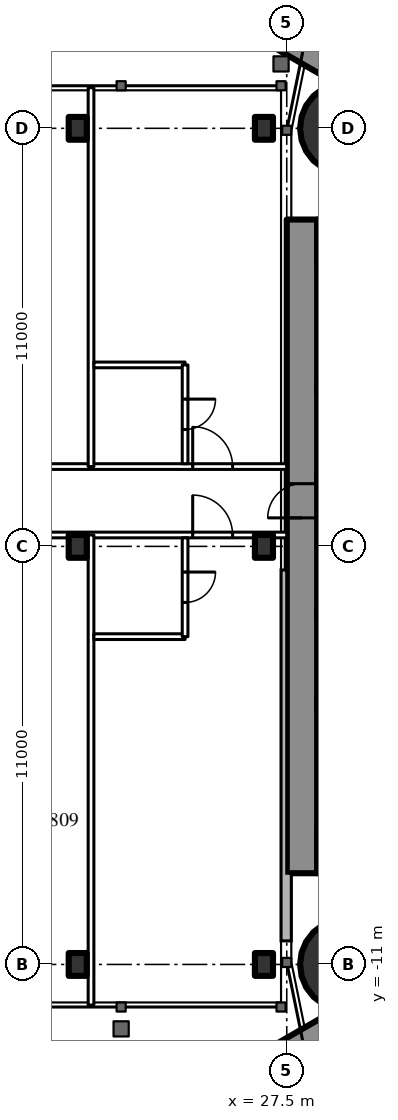
"""IFC4 building model, lengths in metres.
Left out: names, types, materials, properties, quantities, classifications, styles, units other than length and angle.
Written with IfcOpenShell. Run it as: python <this file> out.ifc"""

import sys

from ifc_helpers import new_model, si_unit, direction, frame, frame_2d, origin, origin_2d, place, context, subcontext, project, spatial, rectangle, circle, i_section, extrude, element, fill, save


model = new_model("IFC4")
c1 = context("Model", 3, precision=1e-05, world=origin(), true_north=direction((0.0, 1.0)))
c2 = subcontext(c1, "Body", "Model", "MODEL_VIEW")
j1 = project(units=[si_unit("LENGTHUNIT", "METRE"), si_unit("PLANEANGLEUNIT", "RADIAN")], contexts=[c1])
p1 = place(None, origin())
s1 = spatial("IfcSite", under=j1, at=p1, CompositionType="ELEMENT")
p2 = place(p1, origin())
s2 = spatial("IfcBuilding", under=s1, at=p2, CompositionType="ELEMENT")
p3 = place(p2, frame((0.0, 0.0, 218.9)))
s3 = spatial("IfcBuildingStorey", under=s2, at=p3, CompositionType="ELEMENT", Elevation=218.9)
for number, where, z_axis, x_axis in (
    (1, (29.05, 11.0, 0.0), (0.0, 0.0, 1.0), (1.0, 0.0, 0.0)),
    (2, (29.05, -11.0, 0.0), (0.0, 0.0, 1.0), (1.0, 0.0, 0.0)),
):
    element("IfcColumn", number, at=place(p3, frame(where, z_axis=z_axis, x_axis=x_axis)), inside=s3, PredefinedType="COLUMN", context=c2, shape_type="SweptSolid", body=[
        extrude(circle(Radius=1.2, at=origin_2d()), origin(), (0.0, 0.0, 1.0), 3.6),
    ])
p4 = place(p3, frame((27.9, -8.6, 0.0), z_axis=(0.0, 0.0, 1.0), x_axis=(0.0, 1.0, 0.0)))
e3 = element("IfcWall", 3, at=p4, inside=s3, PredefinedType="SHEAR", context=c2, shape_type="SweptSolid", body=[
    extrude(rectangle(XDim=17.2, YDim=0.8, at=frame_2d((8.6, 0.0))), origin(), (0.0, 0.0, 1.0), 3.6),
])
p5 = place(p4, frame((9.35, 0.0, 0.0)))
e4 = element("IfcOpeningElement", 4, at=p5, cuts=e3, PredefinedType="OPENING", context=c2, shape_type="SweptSolid", body=[
    extrude(rectangle(XDim=0.9, YDim=2.2, at=frame_2d((0.45, 1.1))), frame((0.0, 0.41, 0.0), z_axis=(0.0, -1.0, 0.0), x_axis=(1.0, 0.0, 0.0)), (0.0, 0.0, 1.0), 0.82),
])
p6 = place(p3, frame((28.3, -8.0, 0.0), z_axis=(0.0, 0.0, 1.0), x_axis=(1.0, 0.0, 0.0)))
e5 = element("IfcWall", 5, at=p6, inside=s3, PredefinedType="SHEAR", context=c2, shape_type="SweptSolid", body=[
    extrude(rectangle(XDim=8.4, YDim=1.2, at=frame_2d((4.2, 0.0))), origin(), (0.0, 0.0, 1.0), 3.6),
])
p7 = place(p6, frame((0.25, 0.0, 0.0)))
e6 = element("IfcOpeningElement", 6, at=p7, cuts=e5, PredefinedType="OPENING", context=c2, shape_type="SweptSolid", body=[
    extrude(rectangle(XDim=1.0, YDim=2.2, at=frame_2d((0.5, 1.1))), frame((0.0, 0.61, 0.0), z_axis=(0.0, -1.0, 0.0), x_axis=(1.0, 0.0, 0.0)), (0.0, 0.0, 1.0), 1.22),
])
p8 = place(p3, frame((28.3, 8.0, 0.0), z_axis=(0.0, 0.0, 1.0), x_axis=(1.0, 0.0, 0.0)))
e7 = element("IfcWall", 7, at=p8, inside=s3, PredefinedType="SHEAR", context=c2, shape_type="SweptSolid", body=[
    extrude(rectangle(XDim=8.4, YDim=1.2, at=frame_2d((4.2, 0.0))), origin(), (0.0, 0.0, 1.0), 3.6),
])
p9 = place(p8, frame((0.25, 0.0, 0.0)))
e8 = element("IfcOpeningElement", 8, at=p9, cuts=e7, PredefinedType="OPENING", context=c2, shape_type="SweptSolid", body=[
    extrude(rectangle(XDim=1.0, YDim=2.2, at=frame_2d((0.5, 1.1))), frame((0.0, 0.61, 0.0), z_axis=(0.0, -1.0, 0.0), x_axis=(1.0, 0.0, 0.0)), (0.0, 0.0, 1.0), 1.22),
])
for number, where, z_axis, x_axis in (
    (9, (28.3, -4.15, 0.0), (0.0, 0.0, 1.0), (1.0, 0.0, 0.0)),
    (10, (28.3, 4.15, 0.0), (0.0, 0.0, 1.0), (1.0, 0.0, 0.0)),
):
    element("IfcWall", number, at=place(p3, frame(where, z_axis=z_axis, x_axis=x_axis)), inside=s3, PredefinedType="SHEAR", context=c2, shape_type="SweptSolid", body=[
        extrude(rectangle(XDim=8.4, YDim=0.3, at=frame_2d((4.2, 0.0))), origin(), (0.0, 0.0, 1.0), 3.6),
    ])
for number, where, z_axis, x_axis in (
    (11, (28.3, -1.775, 0.0), (0.0, 0.0, 1.0), (1.0, 0.0, 0.0)),
    (12, (28.3, 1.775, 0.0), (0.0, 0.0, 1.0), (1.0, 0.0, 0.0)),
):
    element("IfcWall", number, at=place(p3, frame(where, z_axis=z_axis, x_axis=x_axis)), inside=s3, PredefinedType="SHEAR", context=c2, shape_type="SweptSolid", body=[
        extrude(rectangle(XDim=2.9, YDim=0.25, at=frame_2d((1.45, 0.0))), origin(), (0.0, 0.0, 1.0), 3.6),
    ])
p10 = place(p3, frame((27.2, -13.8, 0.0), z_axis=(0.0, 0.0, 1.0), x_axis=(0.866027159892, 0.499996958321, 0.0)))
e13 = element("IfcWall", 13, at=p10, inside=s3, PredefinedType="SHEAR", context=c2, shape_type="SweptSolid", body=[
    extrude(rectangle(XDim=27.947, YDim=1.2, at=frame_2d((13.973, 0.0))), origin(), (0.0, 0.0, 1.0), 3.6),
])
p11 = place(p10, frame((4.6, 0.0, 0.0)))
e14 = element("IfcOpeningElement", 14, at=p11, cuts=e13, PredefinedType="OPENING", context=c2, shape_type="SweptSolid", body=[
    extrude(rectangle(XDim=1.0, YDim=2.2, at=frame_2d((0.5, 1.1))), frame((0.0, 0.61, 0.0), z_axis=(0.0, -1.0, 0.0), x_axis=(1.0, 0.0, 0.0)), (0.0, 0.0, 1.0), 1.22),
])
p12 = place(p10, frame((13.395, 0.0, 0.0)))
e15 = element("IfcOpeningElement", 15, at=p12, cuts=e13, PredefinedType="OPENING", context=c2, shape_type="SweptSolid", body=[
    extrude(rectangle(XDim=1.8, YDim=2.2, at=frame_2d((0.9, 1.1))), frame((0.0, 0.61, 0.0), z_axis=(0.0, -1.0, 0.0), x_axis=(1.0, 0.0, 0.0)), (0.0, 0.0, 1.0), 1.22),
])
p13 = place(p3, frame((27.2, 13.8, 0.0), z_axis=(0.0, 0.0, 1.0), x_axis=(0.866024515034, -0.500001539357, 0.0)))
e16 = element("IfcWall", 16, at=p13, inside=s3, PredefinedType="SHEAR", context=c2, shape_type="SweptSolid", body=[
    extrude(rectangle(XDim=26.907, YDim=1.2, at=frame_2d((13.454, 0.0))), origin(), (0.0, 0.0, 1.0), 3.6),
])
p14 = place(p13, frame((4.6, 0.0, 0.0)))
e17 = element("IfcOpeningElement", 17, at=p14, cuts=e16, PredefinedType="OPENING", context=c2, shape_type="SweptSolid", body=[
    extrude(rectangle(XDim=1.0, YDim=2.2, at=frame_2d((0.5, 1.1))), frame((0.0, 0.61, 0.0), z_axis=(0.0, -1.0, 0.0), x_axis=(1.0, 0.0, 0.0)), (0.0, 0.0, 1.0), 1.22),
])
p15 = place(p13, frame((13.395, 0.0, 0.0)))
e18 = element("IfcOpeningElement", 18, at=p15, cuts=e16, PredefinedType="OPENING", context=c2, shape_type="SweptSolid", body=[
    extrude(rectangle(XDim=1.8, YDim=2.2, at=frame_2d((0.9, 1.1))), frame((0.0, 0.61, 0.0), z_axis=(0.0, -1.0, 0.0), x_axis=(1.0, 0.0, 0.0)), (0.0, 0.0, 1.0), 1.22),
])
for number, where, z_axis, x_axis in (
    (19, (22.0, -11.0, 0.0), (0.0, 0.0, 1.0), (1.0, 0.0, 0.0)),
    (20, (26.9, -11.0, 0.0), (0.0, 0.0, 1.0), (1.0, 0.0, 0.0)),
    (21, (22.0, 0.0, 0.0), (0.0, 0.0, 1.0), (1.0, 0.0, 0.0)),
    (22, (26.9, 0.0, 0.0), (0.0, 0.0, 1.0), (1.0, 0.0, 0.0)),
    (23, (22.0, 11.0, 0.0), (0.0, 0.0, 1.0), (1.0, 0.0, 0.0)),
    (24, (26.9, 11.0, 0.0), (0.0, 0.0, 1.0), (1.0, 0.0, 0.0)),
):
    element("IfcColumn", number, at=place(p3, frame(where, z_axis=z_axis, x_axis=x_axis)), inside=s3, PredefinedType="COLUMN", context=c2, shape_type="SweptSolid", body=[
        extrude(i_section(OverallWidth=0.476, OverallDepth=0.6, WebThickness=0.1, FlangeThickness=0.14, FilletRadius=0.02, at=origin_2d()), origin(), (0.0, 0.0, 1.0), 3.6),
    ])
p16 = place(p3, frame((-27.5, 0.3, 0.0), z_axis=(0.0, 0.0, 1.0), x_axis=(1.0, 0.0, 0.0)))
e25 = element("IfcWall", 25, at=p16, inside=s3, PredefinedType="PARTITIONING", context=c2, shape_type="SweptSolid", body=[
    extrude(rectangle(XDim=55.0, YDim=0.15, at=frame_2d((27.5, 0.0))), origin(), (0.0, 0.0, 1.0), 2.4),
])
p17 = place(p16, frame((1.575, 0.0, 0.0)))
e26 = element("IfcOpeningElement", 26, at=p17, cuts=e25, PredefinedType="OPENING", context=c2, shape_type="SweptSolid", body=[
    extrude(rectangle(XDim=1.0, YDim=2.2, at=frame_2d((0.5, 1.1))), frame((0.0, 0.085, 0.0), z_axis=(0.0, -1.0, 0.0), x_axis=(1.0, 0.0, 0.0)), (0.0, 0.0, 1.0), 0.17),
])
p18 = place(p16, frame((8.525, 0.0, 0.0)))
e27 = element("IfcOpeningElement", 27, at=p18, cuts=e25, PredefinedType="OPENING", context=c2, shape_type="SweptSolid", body=[
    extrude(rectangle(XDim=1.05, YDim=2.4, at=frame_2d((0.525, 1.2))), frame((0.0, 0.085, 0.0), z_axis=(0.0, -1.0, 0.0), x_axis=(1.0, 0.0, 0.0)), (0.0, 0.0, 1.0), 0.17),
])
p19 = place(p16, frame((14.025, 0.0, 0.0)))
e28 = element("IfcOpeningElement", 28, at=p19, cuts=e25, PredefinedType="OPENING", context=c2, shape_type="SweptSolid", body=[
    extrude(rectangle(XDim=1.05, YDim=2.4, at=frame_2d((0.525, 1.2))), frame((0.0, 0.085, 0.0), z_axis=(0.0, -1.0, 0.0), x_axis=(1.0, 0.0, 0.0)), (0.0, 0.0, 1.0), 0.17),
])
p20 = place(p16, frame((19.525, 0.0, 0.0)))
e29 = element("IfcOpeningElement", 29, at=p20, cuts=e25, PredefinedType="OPENING", context=c2, shape_type="SweptSolid", body=[
    extrude(rectangle(XDim=1.05, YDim=2.4, at=frame_2d((0.525, 1.2))), frame((0.0, 0.085, 0.0), z_axis=(0.0, -1.0, 0.0), x_axis=(1.0, 0.0, 0.0)), (0.0, 0.0, 1.0), 0.17),
])
p21 = place(p16, frame((25.025, 0.0, 0.0)))
e30 = element("IfcOpeningElement", 30, at=p21, cuts=e25, PredefinedType="OPENING", context=c2, shape_type="SweptSolid", body=[
    extrude(rectangle(XDim=1.05, YDim=2.4, at=frame_2d((0.525, 1.2))), frame((0.0, 0.085, 0.0), z_axis=(0.0, -1.0, 0.0), x_axis=(1.0, 0.0, 0.0)), (0.0, 0.0, 1.0), 0.17),
])
p22 = place(p16, frame((30.525, 0.0, 0.0)))
e31 = element("IfcOpeningElement", 31, at=p22, cuts=e25, PredefinedType="OPENING", context=c2, shape_type="SweptSolid", body=[
    extrude(rectangle(XDim=1.05, YDim=2.4, at=frame_2d((0.525, 1.2))), frame((0.0, 0.085, 0.0), z_axis=(0.0, -1.0, 0.0), x_axis=(1.0, 0.0, 0.0)), (0.0, 0.0, 1.0), 0.17),
])
p23 = place(p16, frame((36.025, 0.0, 0.0)))
e32 = element("IfcOpeningElement", 32, at=p23, cuts=e25, PredefinedType="OPENING", context=c2, shape_type="SweptSolid", body=[
    extrude(rectangle(XDim=1.05, YDim=2.4, at=frame_2d((0.525, 1.2))), frame((0.0, 0.085, 0.0), z_axis=(0.0, -1.0, 0.0), x_axis=(1.0, 0.0, 0.0)), (0.0, 0.0, 1.0), 0.17),
])
p24 = place(p16, frame((41.525, 0.0, 0.0)))
e33 = element("IfcOpeningElement", 33, at=p24, cuts=e25, PredefinedType="OPENING", context=c2, shape_type="SweptSolid", body=[
    extrude(rectangle(XDim=1.05, YDim=2.4, at=frame_2d((0.525, 1.2))), frame((0.0, 0.085, 0.0), z_axis=(0.0, -1.0, 0.0), x_axis=(1.0, 0.0, 0.0)), (0.0, 0.0, 1.0), 0.17),
])
p25 = place(p16, frame((47.025, 0.0, 0.0)))
e34 = element("IfcOpeningElement", 34, at=p25, cuts=e25, PredefinedType="OPENING", context=c2, shape_type="SweptSolid", body=[
    extrude(rectangle(XDim=1.05, YDim=2.4, at=frame_2d((0.525, 1.2))), frame((0.0, 0.085, 0.0), z_axis=(0.0, -1.0, 0.0), x_axis=(1.0, 0.0, 0.0)), (0.0, 0.0, 1.0), 0.17),
])
p26 = place(p16, frame((52.525, 0.0, 0.0)))
e35 = element("IfcOpeningElement", 35, at=p26, cuts=e25, PredefinedType="OPENING", context=c2, shape_type="SweptSolid", body=[
    extrude(rectangle(XDim=1.05, YDim=2.4, at=frame_2d((0.525, 1.2))), frame((0.0, 0.085, 0.0), z_axis=(0.0, -1.0, 0.0), x_axis=(1.0, 0.0, 0.0)), (0.0, 0.0, 1.0), 0.17),
])
p27 = place(p3, frame((-27.5, 2.1, 0.0), z_axis=(0.0, 0.0, 1.0), x_axis=(1.0, 0.0, 0.0)))
e36 = element("IfcWall", 36, at=p27, inside=s3, PredefinedType="PARTITIONING", context=c2, shape_type="SweptSolid", body=[
    extrude(rectangle(XDim=55.0, YDim=0.15, at=frame_2d((27.5, 0.0))), origin(), (0.0, 0.0, 1.0), 3.4),
])
p28 = place(p27, frame((2.025, 0.0, 0.0)))
e37 = element("IfcOpeningElement", 37, at=p28, cuts=e36, PredefinedType="OPENING", context=c2, shape_type="SweptSolid", body=[
    extrude(rectangle(XDim=1.05, YDim=2.4, at=frame_2d((0.525, 1.2))), frame((0.0, 0.085, 0.0), z_axis=(0.0, -1.0, 0.0), x_axis=(1.0, 0.0, 0.0)), (0.0, 0.0, 1.0), 0.17),
])
p29 = place(p27, frame((8.525, 0.0, 0.0)))
e38 = element("IfcOpeningElement", 38, at=p29, cuts=e36, PredefinedType="OPENING", context=c2, shape_type="SweptSolid", body=[
    extrude(rectangle(XDim=1.05, YDim=2.4, at=frame_2d((0.525, 1.2))), frame((0.0, 0.085, 0.0), z_axis=(0.0, -1.0, 0.0), x_axis=(1.0, 0.0, 0.0)), (0.0, 0.0, 1.0), 0.17),
])
p30 = place(p27, frame((14.025, 0.0, 0.0)))
e39 = element("IfcOpeningElement", 39, at=p30, cuts=e36, PredefinedType="OPENING", context=c2, shape_type="SweptSolid", body=[
    extrude(rectangle(XDim=1.05, YDim=2.4, at=frame_2d((0.525, 1.2))), frame((0.0, 0.085, 0.0), z_axis=(0.0, -1.0, 0.0), x_axis=(1.0, 0.0, 0.0)), (0.0, 0.0, 1.0), 0.17),
])
p31 = place(p27, frame((19.525, 0.0, 0.0)))
e40 = element("IfcOpeningElement", 40, at=p31, cuts=e36, PredefinedType="OPENING", context=c2, shape_type="SweptSolid", body=[
    extrude(rectangle(XDim=1.05, YDim=2.4, at=frame_2d((0.525, 1.2))), frame((0.0, 0.085, 0.0), z_axis=(0.0, -1.0, 0.0), x_axis=(1.0, 0.0, 0.0)), (0.0, 0.0, 1.0), 0.17),
])
p32 = place(p27, frame((25.025, 0.0, 0.0)))
e41 = element("IfcOpeningElement", 41, at=p32, cuts=e36, PredefinedType="OPENING", context=c2, shape_type="SweptSolid", body=[
    extrude(rectangle(XDim=1.05, YDim=2.4, at=frame_2d((0.525, 1.2))), frame((0.0, 0.085, 0.0), z_axis=(0.0, -1.0, 0.0), x_axis=(1.0, 0.0, 0.0)), (0.0, 0.0, 1.0), 0.17),
])
p33 = place(p27, frame((30.525, 0.0, 0.0)))
e42 = element("IfcOpeningElement", 42, at=p33, cuts=e36, PredefinedType="OPENING", context=c2, shape_type="SweptSolid", body=[
    extrude(rectangle(XDim=1.05, YDim=2.4, at=frame_2d((0.525, 1.2))), frame((0.0, 0.085, 0.0), z_axis=(0.0, -1.0, 0.0), x_axis=(1.0, 0.0, 0.0)), (0.0, 0.0, 1.0), 0.17),
])
p34 = place(p27, frame((36.025, 0.0, 0.0)))
e43 = element("IfcOpeningElement", 43, at=p34, cuts=e36, PredefinedType="OPENING", context=c2, shape_type="SweptSolid", body=[
    extrude(rectangle(XDim=1.05, YDim=2.4, at=frame_2d((0.525, 1.2))), frame((0.0, 0.085, 0.0), z_axis=(0.0, -1.0, 0.0), x_axis=(1.0, 0.0, 0.0)), (0.0, 0.0, 1.0), 0.17),
])
p35 = place(p27, frame((41.525, 0.0, 0.0)))
e44 = element("IfcOpeningElement", 44, at=p35, cuts=e36, PredefinedType="OPENING", context=c2, shape_type="SweptSolid", body=[
    extrude(rectangle(XDim=1.05, YDim=2.4, at=frame_2d((0.525, 1.2))), frame((0.0, 0.085, 0.0), z_axis=(0.0, -1.0, 0.0), x_axis=(1.0, 0.0, 0.0)), (0.0, 0.0, 1.0), 0.17),
])
p36 = place(p27, frame((47.025, 0.0, 0.0)))
e45 = element("IfcOpeningElement", 45, at=p36, cuts=e36, PredefinedType="OPENING", context=c2, shape_type="SweptSolid", body=[
    extrude(rectangle(XDim=1.05, YDim=2.4, at=frame_2d((0.525, 1.2))), frame((0.0, 0.085, 0.0), z_axis=(0.0, -1.0, 0.0), x_axis=(1.0, 0.0, 0.0)), (0.0, 0.0, 1.0), 0.17),
])
p37 = place(p27, frame((52.525, 0.0, 0.0)))
e46 = element("IfcOpeningElement", 46, at=p37, cuts=e36, PredefinedType="OPENING", context=c2, shape_type="SweptSolid", body=[
    extrude(rectangle(XDim=1.05, YDim=2.4, at=frame_2d((0.525, 1.2))), frame((0.0, 0.085, 0.0), z_axis=(0.0, -1.0, 0.0), x_axis=(1.0, 0.0, 0.0)), (0.0, 0.0, 1.0), 0.17),
])
p38 = place(p3, frame((22.35, -12.07, 0.0), z_axis=(0.0, 0.0, 1.0), x_axis=(0.0, 1.0, 0.0)))
e47 = element("IfcWall", 47, at=p38, inside=s3, PredefinedType="PARTITIONING", context=c2, shape_type="SweptSolid", body=[
    extrude(rectangle(XDim=12.37, YDim=0.15, at=frame_2d((6.185, 0.0))), origin(), (0.0, 0.0, 1.0), 3.4),
])
p39 = place(p3, frame((22.425, -2.375, 0.0), z_axis=(0.0, 0.0, 1.0), x_axis=(1.0, 0.0, 0.0)))
e48 = element("IfcWall", 48, at=p39, inside=s3, PredefinedType="PARTITIONING", context=c2, shape_type="SweptSolid", body=[
    extrude(rectangle(XDim=2.4, YDim=0.15, at=frame_2d((1.2, 0.0))), origin(), (0.0, 0.0, 1.0), 3.4),
])
p40 = place(p3, frame((24.825, -2.375, 0.0), z_axis=(0.0, 0.0, 1.0), x_axis=(0.0, 1.0, 0.0)))
e49 = element("IfcWall", 49, at=p40, inside=s3, PredefinedType="PARTITIONING", context=c2, shape_type="SweptSolid", body=[
    extrude(rectangle(XDim=2.6, YDim=0.15, at=frame_2d((1.3, 0.0))), origin(), (0.0, 0.0, 1.0), 3.4),
])
p41 = place(p40, frame((0.9, 0.0, 0.0)))
e50 = element("IfcOpeningElement", 50, at=p41, cuts=e49, PredefinedType="OPENING", context=c2, shape_type="SweptSolid", body=[
    extrude(rectangle(XDim=0.8, YDim=2.2, at=frame_2d((0.4, 1.1))), frame((0.0, 0.085, 0.0), z_axis=(0.0, -1.0, 0.0), x_axis=(1.0, 0.0, 0.0)), (0.0, 0.0, 1.0), 0.17),
])
p42 = place(p3, frame((22.35, 2.1, 0.0), z_axis=(0.0, 0.0, 1.0), x_axis=(0.0, 1.0, 0.0)))
e51 = element("IfcWall", 51, at=p42, inside=s3, PredefinedType="PARTITIONING", context=c2, shape_type="SweptSolid", body=[
    extrude(rectangle(XDim=9.97, YDim=0.15, at=frame_2d((4.985, 0.0))), origin(), (0.0, 0.0, 1.0), 3.4),
])
p43 = place(p3, frame((22.425, 4.775, 0.0), z_axis=(0.0, 0.0, 1.0), x_axis=(1.0, 0.0, 0.0)))
e52 = element("IfcWall", 52, at=p43, inside=s3, PredefinedType="PARTITIONING", context=c2, shape_type="SweptSolid", body=[
    extrude(rectangle(XDim=2.4, YDim=0.15, at=frame_2d((1.2, 0.0))), origin(), (0.0, 0.0, 1.0), 3.4),
])
p44 = place(p3, frame((24.825, 2.175, 0.0), z_axis=(0.0, 0.0, 1.0), x_axis=(0.0, 1.0, 0.0)))
e53 = element("IfcWall", 53, at=p44, inside=s3, PredefinedType="PARTITIONING", context=c2, shape_type="SweptSolid", body=[
    extrude(rectangle(XDim=2.6, YDim=0.15, at=frame_2d((1.3, 0.0))), origin(), (0.0, 0.0, 1.0), 3.4),
])
p45 = place(p44, frame((0.9, 0.0, 0.0)))
e54 = element("IfcOpeningElement", 54, at=p45, cuts=e53, PredefinedType="OPENING", context=c2, shape_type="SweptSolid", body=[
    extrude(rectangle(XDim=0.8, YDim=2.2, at=frame_2d((0.4, 1.1))), frame((0.0, 0.085, 0.0), z_axis=(0.0, -1.0, 0.0), x_axis=(1.0, 0.0, 0.0)), (0.0, 0.0, 1.0), 0.17),
])
p46 = place(p5, origin())
e55 = element("IfcDoor", 55, at=p46, inside=s3, OperationType="SINGLE_SWING_LEFT", PredefinedType="DOOR", context=c2, shape_type="SweptSolid", body=[
    extrude(rectangle(XDim=0.9, YDim=2.2, at=frame_2d((0.45, 1.1))), frame((0.0, 0.025, 0.0), z_axis=(0.0, -1.0, 0.0), x_axis=(1.0, 0.0, 0.0)), (0.0, 0.0, 1.0), 0.05),
])
fill(e4, e55)
p47 = place(p41, origin())
e56 = element("IfcDoor", 56, at=p47, inside=s3, OperationType="SINGLE_SWING_RIGHT", PredefinedType="DOOR", context=c2, shape_type="SweptSolid", body=[
    extrude(rectangle(XDim=0.8, YDim=2.2, at=frame_2d((0.4, 1.1))), frame((0.0, 0.025, 0.0), z_axis=(0.0, -1.0, 0.0), x_axis=(1.0, 0.0, 0.0)), (0.0, 0.0, 1.0), 0.05),
])
fill(e50, e56)
p48 = place(p26, origin())
e57 = element("IfcDoor", 57, at=p48, inside=s3, OperationType="SINGLE_SWING_LEFT", PredefinedType="DOOR", context=c2, shape_type="SweptSolid", body=[
    extrude(rectangle(XDim=1.05, YDim=2.4, at=frame_2d((0.525, 1.2))), frame((0.0, 0.025, 0.0), z_axis=(0.0, -1.0, 0.0), x_axis=(1.0, 0.0, 0.0)), (0.0, 0.0, 1.0), 0.05),
])
fill(e35, e57)
p49 = place(p45, origin())
e58 = element("IfcDoor", 58, at=p49, inside=s3, OperationType="SINGLE_SWING_RIGHT", PredefinedType="DOOR", context=c2, shape_type="SweptSolid", body=[
    extrude(rectangle(XDim=0.8, YDim=2.2, at=frame_2d((0.4, 1.1))), frame((0.0, 0.025, 0.0), z_axis=(0.0, -1.0, 0.0), x_axis=(1.0, 0.0, 0.0)), (0.0, 0.0, 1.0), 0.05),
])
fill(e54, e58)
p50 = place(p37, origin())
e59 = element("IfcDoor", 59, at=p50, inside=s3, OperationType="SINGLE_SWING_LEFT", PredefinedType="DOOR", context=c2, shape_type="SweptSolid", body=[
    extrude(rectangle(XDim=1.05, YDim=2.4, at=frame_2d((0.525, 1.2))), frame((0.0, 0.025, 0.0), z_axis=(0.0, -1.0, 0.0), x_axis=(1.0, 0.0, 0.0)), (0.0, 0.0, 1.0), 0.05),
])
fill(e46, e59)
save(model, sys.argv[1])
